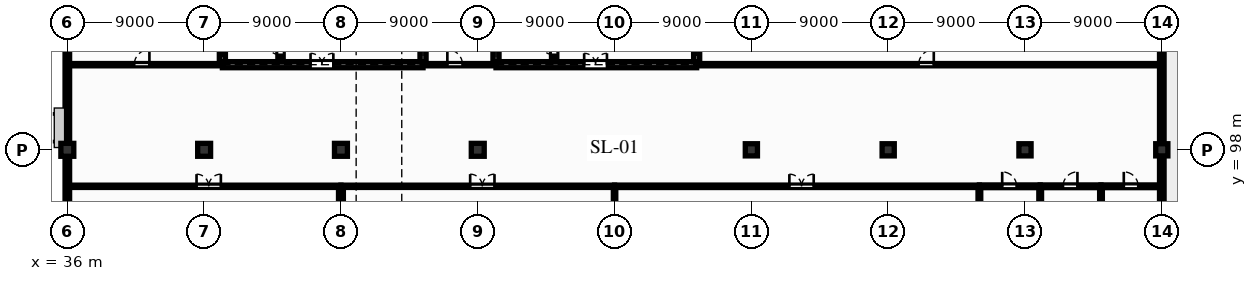
"""IFC4 building model, lengths in metres.
Left out: names, types, materials, properties, quantities, classifications, styles, units other than length and angle.
Written with IfcOpenShell. Run it as: python <this file> out.ifc"""

import sys

from ifc_helpers import new_model, si_unit, direction, frame, frame_2d, origin, origin_2d, place, context, subcontext, project, spatial, rectangle, extrude, element, fill, save


model = new_model("IFC4")
c1 = context("Model", 3, precision=1e-05, world=origin(), true_north=direction((0.0, 1.0)))
c2 = subcontext(c1, "Body", "Model", "MODEL_VIEW")
j1 = project(units=[si_unit("LENGTHUNIT", "METRE"), si_unit("PLANEANGLEUNIT", "RADIAN")], contexts=[c1])
p1 = place(None, origin())
s1 = spatial("IfcSite", under=j1, at=p1, CompositionType="ELEMENT")
p2 = place(p1, origin())
s2 = spatial("IfcBuilding", under=s1, at=p2, CompositionType="ELEMENT")
p3 = place(p2, frame((0.0, 0.0, 5.1)))
s3 = spatial("IfcBuildingStorey", under=s2, at=p3, CompositionType="ELEMENT", Elevation=5.1)
for number, where, z_axis, x_axis in (
    (1, (36.0, 98.0, 0.0), (0.0, 0.0, 1.0), (1.0, 0.0, 0.0)),
    (2, (45.0, 98.0, 0.0), (0.0, 0.0, 1.0), (1.0, 0.0, 0.0)),
    (3, (54.0, 98.0, 0.0), (0.0, 0.0, 1.0), (1.0, 0.0, 0.0)),
    (4, (63.0, 98.0, 0.0), (0.0, 0.0, 1.0), (1.0, 0.0, 0.0)),
    (5, (72.0, 98.0, 0.0), (0.0, 0.0, 1.0), (1.0, 0.0, 0.0)),
):
    element("IfcColumn", number, at=place(p3, frame(where, z_axis=z_axis, x_axis=x_axis)), inside=s3, PredefinedType="COLUMN", context=c2, shape_type="SweptSolid", body=[
        extrude(rectangle(XDim=0.85, YDim=0.85, at=origin_2d()), origin(), (0.0, 0.0, 1.0), 3.84),
    ])
for number, where, z_axis, x_axis in (
    (6, (81.0, 98.0, 0.0), (0.0, 0.0, 1.0), (1.0, 0.0, 0.0)),
    (7, (90.0, 98.0, 0.0), (0.0, 0.0, 1.0), (1.0, 0.0, 0.0)),
    (8, (99.0, 98.0, 0.0), (0.0, 0.0, 1.0), (1.0, 0.0, 0.0)),
    (9, (108.0, 98.0, 0.0), (0.0, 0.0, 1.0), (1.0, 0.0, 0.0)),
):
    element("IfcColumn", number, at=place(p3, frame(where, z_axis=z_axis, x_axis=x_axis)), inside=s3, PredefinedType="COLUMN", context=c2, shape_type="SweptSolid", body=[
        extrude(rectangle(XDim=0.8, YDim=0.8, at=origin_2d()), origin(), (0.0, 0.0, 1.0), 3.84),
    ])
p4 = place(p3, frame((36.0, 82.2, 0.0), z_axis=(0.0, 0.0, 1.0), x_axis=(0.0, 1.0, 0.0)))
e10 = element("IfcWall", 10, at=p4, inside=s3, PredefinedType="SOLIDWALL", context=c2, shape_type="SweptSolid", body=[
    extrude(rectangle(XDim=31.8, YDim=0.3, at=frame_2d((15.9, 0.0))), origin(), (0.0, 0.0, 1.0), 2.855),
])
p5 = place(p4, frame((3.0, 0.0, 0.885)))
e11 = element("IfcOpeningElement", 11, at=p5, cuts=e10, PredefinedType="OPENING", context=c2, shape_type="SweptSolid", body=[
    extrude(rectangle(XDim=1.35, YDim=1.85, at=frame_2d((0.675, 0.925))), frame((0.0, 0.16, 0.0), z_axis=(0.0, -1.0, 0.0), x_axis=(1.0, 0.0, 0.0)), (0.0, 0.0, 1.0), 0.32),
])
p6 = place(p4, frame((9.5, 0.0, 0.95)))
e12 = element("IfcOpeningElement", 12, at=p6, cuts=e10, PredefinedType="OPENING", context=c2, shape_type="SweptSolid", body=[
    extrude(rectangle(XDim=1.05, YDim=1.75, at=frame_2d((0.525, 0.875))), frame((0.0, 0.16, 0.0), z_axis=(0.0, -1.0, 0.0), x_axis=(1.0, 0.0, 0.0)), (0.0, 0.0, 1.0), 0.32),
])
p7 = place(p4, frame((16.5, 0.0, 0.635)))
e13 = element("IfcOpeningElement", 13, at=p7, cuts=e10, PredefinedType="OPENING", context=c2, shape_type="SweptSolid", body=[
    extrude(rectangle(XDim=1.5, YDim=2.1, at=frame_2d((0.75, 1.05))), frame((0.0, 0.16, 0.0), z_axis=(0.0, -1.0, 0.0), x_axis=(1.0, 0.0, 0.0)), (0.0, 0.0, 1.0), 0.32),
])
p8 = place(p3, frame((108.0, 82.2, 0.0), z_axis=(0.0, 0.0, 1.0), x_axis=(0.0, 1.0, 0.0)))
e14 = element("IfcWall", 14, at=p8, inside=s3, PredefinedType="SOLIDWALL", context=c2, shape_type="SweptSolid", body=[
    extrude(rectangle(XDim=31.8, YDim=0.3, at=frame_2d((15.9, 0.0))), origin(), (0.0, 0.0, 1.0), 2.815),
])
p9 = place(p8, frame((3.2, 0.0, 0.595)))
e15 = element("IfcOpeningElement", 15, at=p9, cuts=e14, PredefinedType="OPENING", context=c2, shape_type="SweptSolid", body=[
    extrude(rectangle(XDim=1.5, YDim=2.1, at=frame_2d((0.75, 1.05))), frame((0.0, 0.16, 0.0), z_axis=(0.0, -1.0, 0.0), x_axis=(1.0, 0.0, 0.0)), (0.0, 0.0, 1.0), 0.32),
])
p10 = place(p8, frame((10.5, 0.0, 0.845)))
e16 = element("IfcOpeningElement", 16, at=p10, cuts=e14, PredefinedType="OPENING", context=c2, shape_type="SweptSolid", body=[
    extrude(rectangle(XDim=1.35, YDim=1.85, at=frame_2d((0.675, 0.925))), frame((0.0, 0.16, 0.0), z_axis=(0.0, -1.0, 0.0), x_axis=(1.0, 0.0, 0.0)), (0.0, 0.0, 1.0), 0.32),
])
p11 = place(p3, frame((46.2, 103.6, 0.0), z_axis=(0.0, 0.0, 1.0), x_axis=(1.0, 0.0, 0.0)))
e17 = element("IfcWall", 17, at=p11, inside=s3, PredefinedType="SHEAR", context=c2, shape_type="SweptSolid", body=[
    extrude(rectangle(XDim=13.2, YDim=0.4, at=frame_2d((6.6, 0.0))), origin(), (0.0, 0.0, 1.0), 3.55),
])
p12 = place(p11, frame((5.8, 0.0, 0.0)))
e18 = element("IfcOpeningElement", 18, at=p12, cuts=e17, PredefinedType="OPENING", context=c2, shape_type="SweptSolid", body=[
    extrude(rectangle(XDim=1.5, YDim=2.2, at=frame_2d((0.75, 1.1))), frame((0.0, 0.21, 0.0), z_axis=(0.0, -1.0, 0.0), x_axis=(1.0, 0.0, 0.0)), (0.0, 0.0, 1.0), 0.42),
])
for number, where, z_axis, x_axis in (
    (19, (46.2, 103.8, 0.0), (0.0, 0.0, 1.0), (0.0, 1.0, 0.0)),
    (20, (59.4, 103.8, 0.0), (0.0, 0.0, 1.0), (0.0, 1.0, 0.0)),
):
    element("IfcWall", number, at=place(p3, frame(where, z_axis=z_axis, x_axis=x_axis)), inside=s3, PredefinedType="SHEAR", context=c2, shape_type="SweptSolid", body=[
        extrude(rectangle(XDim=10.01, YDim=0.4, at=frame_2d((5.005, 0.0))), origin(), (0.0, 0.0, 1.0), 3.55),
    ])
p13 = place(p3, frame((50.025, 103.8, 0.0), z_axis=(0.0, 0.0, 1.0), x_axis=(0.0, 1.0, 0.0)))
e21 = element("IfcWall", 21, at=p13, inside=s3, PredefinedType="SHEAR", context=c2, shape_type="SweptSolid", body=[
    extrude(rectangle(XDim=10.01, YDim=0.35, at=frame_2d((5.005, 0.0))), origin(), (0.0, 0.0, 1.0), 3.55),
])
p14 = place(p13, frame((0.45, 0.0, 0.0)))
e22 = element("IfcOpeningElement", 22, at=p14, cuts=e21, PredefinedType="OPENING", context=c2, shape_type="SweptSolid", body=[
    extrude(rectangle(XDim=1.05, YDim=2.2, at=frame_2d((0.525, 1.1))), frame((0.0, 0.185, 0.0), z_axis=(0.0, -1.0, 0.0), x_axis=(1.0, 0.0, 0.0)), (0.0, 0.0, 1.0), 0.37),
])
p15 = place(p3, frame((64.2, 103.6, 0.0), z_axis=(0.0, 0.0, 1.0), x_axis=(1.0, 0.0, 0.0)))
e23 = element("IfcWall", 23, at=p15, inside=s3, PredefinedType="SHEAR", context=c2, shape_type="SweptSolid", body=[
    extrude(rectangle(XDim=13.2, YDim=0.4, at=frame_2d((6.6, 0.0))), origin(), (0.0, 0.0, 1.0), 3.55),
])
p16 = place(p15, frame((5.8, 0.0, 0.0)))
e24 = element("IfcOpeningElement", 24, at=p16, cuts=e23, PredefinedType="OPENING", context=c2, shape_type="SweptSolid", body=[
    extrude(rectangle(XDim=1.5, YDim=2.2, at=frame_2d((0.75, 1.1))), frame((0.0, 0.21, 0.0), z_axis=(0.0, -1.0, 0.0), x_axis=(1.0, 0.0, 0.0)), (0.0, 0.0, 1.0), 0.42),
])
for number, where, z_axis, x_axis in (
    (25, (64.2, 103.8, 0.0), (0.0, 0.0, 1.0), (0.0, 1.0, 0.0)),
    (26, (77.4, 103.8, 0.0), (0.0, 0.0, 1.0), (0.0, 1.0, 0.0)),
):
    element("IfcWall", number, at=place(p3, frame(where, z_axis=z_axis, x_axis=x_axis)), inside=s3, PredefinedType="SHEAR", context=c2, shape_type="SweptSolid", body=[
        extrude(rectangle(XDim=10.01, YDim=0.4, at=frame_2d((5.005, 0.0))), origin(), (0.0, 0.0, 1.0), 3.55),
    ])
p17 = place(p3, frame((68.025, 103.8, 0.0), z_axis=(0.0, 0.0, 1.0), x_axis=(0.0, 1.0, 0.0)))
e27 = element("IfcWall", 27, at=p17, inside=s3, PredefinedType="SHEAR", context=c2, shape_type="SweptSolid", body=[
    extrude(rectangle(XDim=10.01, YDim=0.35, at=frame_2d((5.005, 0.0))), origin(), (0.0, 0.0, 1.0), 3.55),
])
p18 = place(p17, frame((0.45, 0.0, 0.0)))
e28 = element("IfcOpeningElement", 28, at=p18, cuts=e27, PredefinedType="OPENING", context=c2, shape_type="SweptSolid", body=[
    extrude(rectangle(XDim=1.05, YDim=2.2, at=frame_2d((0.525, 1.1))), frame((0.0, 0.185, 0.0), z_axis=(0.0, -1.0, 0.0), x_axis=(1.0, 0.0, 0.0)), (0.0, 0.0, 1.0), 0.37),
])
p19 = place(p3, frame((36.0, 95.6, 0.0), z_axis=(0.0, 0.0, 1.0), x_axis=(1.0, 0.0, 0.0)))
e29 = element("IfcWall", 29, at=p19, inside=s3, PredefinedType="PARTITIONING", context=c2, shape_type="SweptSolid", body=[
    extrude(rectangle(XDim=18.0, YDim=0.15, at=frame_2d((9.0, 0.0))), origin(), (0.0, 0.0, 1.0), 2.735),
])
p20 = place(p19, frame((8.5, 0.0, 0.0)))
e30 = element("IfcOpeningElement", 30, at=p20, cuts=e29, PredefinedType="OPENING", context=c2, shape_type="SweptSolid", body=[
    extrude(rectangle(XDim=1.6, YDim=2.2, at=frame_2d((0.8, 1.1))), frame((0.0, 0.085, 0.0), z_axis=(0.0, -1.0, 0.0), x_axis=(1.0, 0.0, 0.0)), (0.0, 0.0, 1.0), 0.17),
])
p21 = place(p3, frame((54.0, 95.6, 0.0), z_axis=(0.0, 0.0, 1.0), x_axis=(1.0, 0.0, 0.0)))
e31 = element("IfcWall", 31, at=p21, inside=s3, PredefinedType="PARTITIONING", context=c2, shape_type="SweptSolid", body=[
    extrude(rectangle(XDim=18.0, YDim=0.15, at=frame_2d((9.0, 0.0))), origin(), (0.0, 0.0, 1.0), 2.735),
])
p22 = place(p21, frame((8.5, 0.0, 0.0)))
e32 = element("IfcOpeningElement", 32, at=p22, cuts=e31, PredefinedType="OPENING", context=c2, shape_type="SweptSolid", body=[
    extrude(rectangle(XDim=1.6, YDim=2.2, at=frame_2d((0.8, 1.1))), frame((0.0, 0.085, 0.0), z_axis=(0.0, -1.0, 0.0), x_axis=(1.0, 0.0, 0.0)), (0.0, 0.0, 1.0), 0.17),
])
p23 = place(p3, frame((54.0, 82.2, 0.0), z_axis=(0.0, 0.0, 1.0), x_axis=(0.0, 1.0, 0.0)))
e33 = element("IfcWall", 33, at=p23, inside=s3, PredefinedType="SHEAR", context=c2, shape_type="SweptSolid", body=[
    extrude(rectangle(XDim=13.4, YDim=0.32, at=frame_2d((6.7, 0.0))), origin(), (0.0, 0.0, 1.0), 3.55),
])
p24 = place(p3, frame((72.0, 95.6, 0.0), z_axis=(0.0, 0.0, 1.0), x_axis=(1.0, 0.0, 0.0)))
e34 = element("IfcWall", 34, at=p24, inside=s3, PredefinedType="PARTITIONING", context=c2, shape_type="SweptSolid", body=[
    extrude(rectangle(XDim=24.0, YDim=0.16, at=frame_2d((12.0, 0.0))), origin(), (0.0, 0.0, 1.0), 3.55),
])
p25 = place(p24, frame((11.5, 0.0, 0.0)))
e35 = element("IfcOpeningElement", 35, at=p25, cuts=e34, PredefinedType="OPENING", context=c2, shape_type="SweptSolid", body=[
    extrude(rectangle(XDim=1.6, YDim=2.2, at=frame_2d((0.8, 1.1))), frame((0.0, 0.09, 0.0), z_axis=(0.0, -1.0, 0.0), x_axis=(1.0, 0.0, 0.0)), (0.0, 0.0, 1.0), 0.18),
])
p26 = place(p3, frame((72.0, 82.2, 0.0), z_axis=(0.0, 0.0, 1.0), x_axis=(0.0, 1.0, 0.0)))
e36 = element("IfcWall", 36, at=p26, inside=s3, PredefinedType="PARTITIONING", context=c2, shape_type="SweptSolid", body=[
    extrude(rectangle(XDim=13.4, YDim=0.16, at=frame_2d((6.7, 0.0))), origin(), (0.0, 0.0, 1.0), 2.855),
])
p27 = place(p3, frame((96.0, 95.6, 0.0), z_axis=(0.0, 0.0, 1.0), x_axis=(1.0, 0.0, 0.0)))
e37 = element("IfcWall", 37, at=p27, inside=s3, PredefinedType="PLUMBINGWALL", context=c2, shape_type="SweptSolid", body=[
    extrude(rectangle(XDim=4.0, YDim=0.18, at=frame_2d((2.0, 0.0))), origin(), (0.0, 0.0, 1.0), 3.55),
])
p28 = place(p27, frame((1.5, 0.0, 0.0)))
e38 = element("IfcOpeningElement", 38, at=p28, cuts=e37, PredefinedType="OPENING", context=c2, shape_type="SweptSolid", body=[
    extrude(rectangle(XDim=0.95, YDim=2.15, at=frame_2d((0.475, 1.075))), frame((0.0, 0.1, 0.0), z_axis=(0.0, -1.0, 0.0), x_axis=(1.0, 0.0, 0.0)), (0.0, 0.0, 1.0), 0.2),
])
p29 = place(p3, frame((96.0, 82.2, 0.0), z_axis=(0.0, 0.0, 1.0), x_axis=(0.0, 1.0, 0.0)))
e39 = element("IfcWall", 39, at=p29, inside=s3, PredefinedType="PLUMBINGWALL", context=c2, shape_type="SweptSolid", body=[
    extrude(rectangle(XDim=13.4, YDim=0.18, at=frame_2d((6.7, 0.0))), origin(), (0.0, 0.0, 1.0), 3.55),
])
p30 = place(p3, frame((100.0, 95.6, 0.0), z_axis=(0.0, 0.0, 1.0), x_axis=(1.0, 0.0, 0.0)))
e40 = element("IfcWall", 40, at=p30, inside=s3, PredefinedType="PLUMBINGWALL", context=c2, shape_type="SweptSolid", body=[
    extrude(rectangle(XDim=4.0, YDim=0.18, at=frame_2d((2.0, 0.0))), origin(), (0.0, 0.0, 1.0), 3.55),
])
p31 = place(p30, frame((1.5, 0.0, 0.0)))
e41 = element("IfcOpeningElement", 41, at=p31, cuts=e40, PredefinedType="OPENING", context=c2, shape_type="SweptSolid", body=[
    extrude(rectangle(XDim=0.95, YDim=2.15, at=frame_2d((0.475, 1.075))), frame((0.0, 0.1, 0.0), z_axis=(0.0, -1.0, 0.0), x_axis=(1.0, 0.0, 0.0)), (0.0, 0.0, 1.0), 0.2),
])
p32 = place(p3, frame((100.0, 82.2, 0.0), z_axis=(0.0, 0.0, 1.0), x_axis=(0.0, 1.0, 0.0)))
e42 = element("IfcWall", 42, at=p32, inside=s3, PredefinedType="PLUMBINGWALL", context=c2, shape_type="SweptSolid", body=[
    extrude(rectangle(XDim=13.4, YDim=0.18, at=frame_2d((6.7, 0.0))), origin(), (0.0, 0.0, 1.0), 3.55),
])
p33 = place(p3, frame((104.0, 95.6, 0.0), z_axis=(0.0, 0.0, 1.0), x_axis=(1.0, 0.0, 0.0)))
e43 = element("IfcWall", 43, at=p33, inside=s3, PredefinedType="PLUMBINGWALL", context=c2, shape_type="SweptSolid", body=[
    extrude(rectangle(XDim=4.0, YDim=0.18, at=frame_2d((2.0, 0.0))), origin(), (0.0, 0.0, 1.0), 3.55),
])
p34 = place(p33, frame((1.5, 0.0, 0.0)))
e44 = element("IfcOpeningElement", 44, at=p34, cuts=e43, PredefinedType="OPENING", context=c2, shape_type="SweptSolid", body=[
    extrude(rectangle(XDim=0.95, YDim=2.15, at=frame_2d((0.475, 1.075))), frame((0.0, 0.1, 0.0), z_axis=(0.0, -1.0, 0.0), x_axis=(1.0, 0.0, 0.0)), (0.0, 0.0, 1.0), 0.2),
])
p35 = place(p3, frame((104.0, 82.2, 0.0), z_axis=(0.0, 0.0, 1.0), x_axis=(0.0, 1.0, 0.0)))
e45 = element("IfcWall", 45, at=p35, inside=s3, PredefinedType="PLUMBINGWALL", context=c2, shape_type="SweptSolid", body=[
    extrude(rectangle(XDim=13.4, YDim=0.18, at=frame_2d((6.7, 0.0))), origin(), (0.0, 0.0, 1.0), 3.55),
])
p36 = place(p3, frame((36.0, 103.6, 0.0), z_axis=(0.0, 0.0, 1.0), x_axis=(1.0, 0.0, 0.0)))
e46 = element("IfcWall", 46, at=p36, inside=s3, PredefinedType="PARTITIONING", context=c2, shape_type="SweptSolid", body=[
    extrude(rectangle(XDim=10.2, YDim=0.15, at=frame_2d((5.1, 0.0))), origin(), (0.0, 0.0, 1.0), 3.55),
])
p37 = place(p36, frame((4.4, 0.0, 0.0)))
e47 = element("IfcOpeningElement", 47, at=p37, cuts=e46, PredefinedType="OPENING", context=c2, shape_type="SweptSolid", body=[
    extrude(rectangle(XDim=1.0, YDim=2.15, at=frame_2d((0.5, 1.075))), frame((0.0, 0.085, 0.0), z_axis=(0.0, -1.0, 0.0), x_axis=(1.0, 0.0, 0.0)), (0.0, 0.0, 1.0), 0.17),
])
p38 = place(p3, frame((59.4, 103.6, 0.0), z_axis=(0.0, 0.0, 1.0), x_axis=(1.0, 0.0, 0.0)))
e48 = element("IfcWall", 48, at=p38, inside=s3, PredefinedType="PARTITIONING", context=c2, shape_type="SweptSolid", body=[
    extrude(rectangle(XDim=4.8, YDim=0.15, at=frame_2d((2.4, 0.0))), origin(), (0.0, 0.0, 1.0), 3.55),
])
p39 = place(p38, frame((1.6, 0.0, 0.0)))
e49 = element("IfcOpeningElement", 49, at=p39, cuts=e48, PredefinedType="OPENING", context=c2, shape_type="SweptSolid", body=[
    extrude(rectangle(XDim=1.0, YDim=2.15, at=frame_2d((0.5, 1.075))), frame((0.0, 0.085, 0.0), z_axis=(0.0, -1.0, 0.0), x_axis=(1.0, 0.0, 0.0)), (0.0, 0.0, 1.0), 0.17),
])
p40 = place(p3, frame((77.4, 103.6, 0.0), z_axis=(0.0, 0.0, 1.0), x_axis=(1.0, 0.0, 0.0)))
e50 = element("IfcWall", 50, at=p40, inside=s3, PredefinedType="PARTITIONING", context=c2, shape_type="SweptSolid", body=[
    extrude(rectangle(XDim=30.6, YDim=0.15, at=frame_2d((15.3, 0.0))), origin(), (0.0, 0.0, 1.0), 3.55),
])
p41 = place(p40, frame((14.6, 0.0, 0.0)))
e51 = element("IfcOpeningElement", 51, at=p41, cuts=e50, PredefinedType="OPENING", context=c2, shape_type="SweptSolid", body=[
    extrude(rectangle(XDim=1.0, YDim=2.15, at=frame_2d((0.5, 1.075))), frame((0.0, 0.085, 0.0), z_axis=(0.0, -1.0, 0.0), x_axis=(1.0, 0.0, 0.0)), (0.0, 0.0, 1.0), 0.17),
])
p42 = place(p7, origin())
e52 = element("IfcWindow", 52, at=p42, inside=s3, PartitioningType="SINGLE_PANEL", PredefinedType="WINDOW", context=c2, shape_type="SweptSolid", body=[
    extrude(rectangle(XDim=1.5, YDim=2.1, at=frame_2d((0.75, 1.05))), frame((0.0, 0.03, 0.0), z_axis=(0.0, -1.0, 0.0), x_axis=(1.0, 0.0, 0.0)), (0.0, 0.0, 1.0), 0.06),
])
fill(e13, e52)
p43 = place(p12, origin())
e53 = element("IfcDoor", 53, at=p43, inside=s3, OperationType="DOUBLE_DOOR_SINGLE_SWING", PredefinedType="DOOR", context=c2, shape_type="SweptSolid", body=[
    extrude(rectangle(XDim=1.5, YDim=2.2, at=frame_2d((0.75, 1.1))), frame((0.0, 0.025, 0.0), z_axis=(0.0, -1.0, 0.0), x_axis=(1.0, 0.0, 0.0)), (0.0, 0.0, 1.0), 0.05),
])
fill(e18, e53)
p44 = place(p14, origin())
e54 = element("IfcDoor", 54, at=p44, inside=s3, OperationType="SINGLE_SWING_RIGHT", PredefinedType="DOOR", context=c2, shape_type="SweptSolid", body=[
    extrude(rectangle(XDim=1.05, YDim=2.2, at=frame_2d((0.525, 1.1))), frame((0.0, 0.025, 0.0), z_axis=(0.0, -1.0, 0.0), x_axis=(1.0, 0.0, 0.0)), (0.0, 0.0, 1.0), 0.05),
])
fill(e22, e54)
p45 = place(p16, origin())
e55 = element("IfcDoor", 55, at=p45, inside=s3, OperationType="DOUBLE_DOOR_SINGLE_SWING", PredefinedType="DOOR", context=c2, shape_type="SweptSolid", body=[
    extrude(rectangle(XDim=1.5, YDim=2.2, at=frame_2d((0.75, 1.1))), frame((0.0, 0.025, 0.0), z_axis=(0.0, -1.0, 0.0), x_axis=(1.0, 0.0, 0.0)), (0.0, 0.0, 1.0), 0.05),
])
fill(e24, e55)
p46 = place(p18, origin())
e56 = element("IfcDoor", 56, at=p46, inside=s3, OperationType="SINGLE_SWING_RIGHT", PredefinedType="DOOR", context=c2, shape_type="SweptSolid", body=[
    extrude(rectangle(XDim=1.05, YDim=2.2, at=frame_2d((0.525, 1.1))), frame((0.0, 0.025, 0.0), z_axis=(0.0, -1.0, 0.0), x_axis=(1.0, 0.0, 0.0)), (0.0, 0.0, 1.0), 0.05),
])
fill(e28, e56)
p47 = place(p20, origin())
e57 = element("IfcDoor", 57, at=p47, inside=s3, OperationType="DOUBLE_DOOR_SINGLE_SWING", PredefinedType="DOOR", context=c2, shape_type="SweptSolid", body=[
    extrude(rectangle(XDim=1.6, YDim=2.2, at=frame_2d((0.8, 1.1))), frame((0.0, 0.025, 0.0), z_axis=(0.0, -1.0, 0.0), x_axis=(1.0, 0.0, 0.0)), (0.0, 0.0, 1.0), 0.05),
])
fill(e30, e57)
p48 = place(p22, origin())
e58 = element("IfcDoor", 58, at=p48, inside=s3, OperationType="DOUBLE_DOOR_SINGLE_SWING", PredefinedType="DOOR", context=c2, shape_type="SweptSolid", body=[
    extrude(rectangle(XDim=1.6, YDim=2.2, at=frame_2d((0.8, 1.1))), frame((0.0, 0.025, 0.0), z_axis=(0.0, -1.0, 0.0), x_axis=(1.0, 0.0, 0.0)), (0.0, 0.0, 1.0), 0.05),
])
fill(e32, e58)
p49 = place(p25, origin())
e59 = element("IfcDoor", 59, at=p49, inside=s3, OperationType="DOUBLE_DOOR_SINGLE_SWING", PredefinedType="DOOR", context=c2, shape_type="SweptSolid", body=[
    extrude(rectangle(XDim=1.6, YDim=2.2, at=frame_2d((0.8, 1.1))), frame((0.0, 0.025, 0.0), z_axis=(0.0, -1.0, 0.0), x_axis=(1.0, 0.0, 0.0)), (0.0, 0.0, 1.0), 0.05),
])
fill(e35, e59)
p50 = place(p28, origin())
e60 = element("IfcDoor", 60, at=p50, inside=s3, OperationType="SINGLE_SWING_LEFT", PredefinedType="DOOR", context=c2, shape_type="SweptSolid", body=[
    extrude(rectangle(XDim=0.95, YDim=2.15, at=frame_2d((0.475, 1.075))), frame((0.0, 0.025, 0.0), z_axis=(0.0, -1.0, 0.0), x_axis=(1.0, 0.0, 0.0)), (0.0, 0.0, 1.0), 0.05),
])
fill(e38, e60)
p51 = place(p31, origin())
e61 = element("IfcDoor", 61, at=p51, inside=s3, OperationType="SINGLE_SWING_RIGHT", PredefinedType="DOOR", context=c2, shape_type="SweptSolid", body=[
    extrude(rectangle(XDim=0.95, YDim=2.15, at=frame_2d((0.475, 1.075))), frame((0.0, 0.025, 0.0), z_axis=(0.0, -1.0, 0.0), x_axis=(1.0, 0.0, 0.0)), (0.0, 0.0, 1.0), 0.05),
])
fill(e41, e61)
p52 = place(p34, origin())
e62 = element("IfcDoor", 62, at=p52, inside=s3, OperationType="SINGLE_SWING_LEFT", PredefinedType="DOOR", context=c2, shape_type="SweptSolid", body=[
    extrude(rectangle(XDim=0.95, YDim=2.15, at=frame_2d((0.475, 1.075))), frame((0.0, 0.025, 0.0), z_axis=(0.0, -1.0, 0.0), x_axis=(1.0, 0.0, 0.0)), (0.0, 0.0, 1.0), 0.05),
])
fill(e44, e62)
p53 = place(p37, origin())
e63 = element("IfcDoor", 63, at=p53, inside=s3, OperationType="SINGLE_SWING_RIGHT", PredefinedType="DOOR", context=c2, shape_type="SweptSolid", body=[
    extrude(rectangle(XDim=1.0, YDim=2.15, at=frame_2d((0.5, 1.075))), frame((0.0, 0.025, 0.0), z_axis=(0.0, -1.0, 0.0), x_axis=(1.0, 0.0, 0.0)), (0.0, 0.0, 1.0), 0.05),
])
fill(e47, e63)
p54 = place(p39, origin())
e64 = element("IfcDoor", 64, at=p54, inside=s3, OperationType="SINGLE_SWING_LEFT", PredefinedType="DOOR", context=c2, shape_type="SweptSolid", body=[
    extrude(rectangle(XDim=1.0, YDim=2.15, at=frame_2d((0.5, 1.075))), frame((0.0, 0.025, 0.0), z_axis=(0.0, -1.0, 0.0), x_axis=(1.0, 0.0, 0.0)), (0.0, 0.0, 1.0), 0.05),
])
fill(e49, e64)
p55 = place(p41, origin())
e65 = element("IfcDoor", 65, at=p55, inside=s3, OperationType="SINGLE_SWING_RIGHT", PredefinedType="DOOR", context=c2, shape_type="SweptSolid", body=[
    extrude(rectangle(XDim=1.0, YDim=2.15, at=frame_2d((0.5, 1.075))), frame((0.0, 0.025, 0.0), z_axis=(0.0, -1.0, 0.0), x_axis=(1.0, 0.0, 0.0)), (0.0, 0.0, 1.0), 0.05),
])
fill(e51, e65)
save(model, sys.argv[1])
